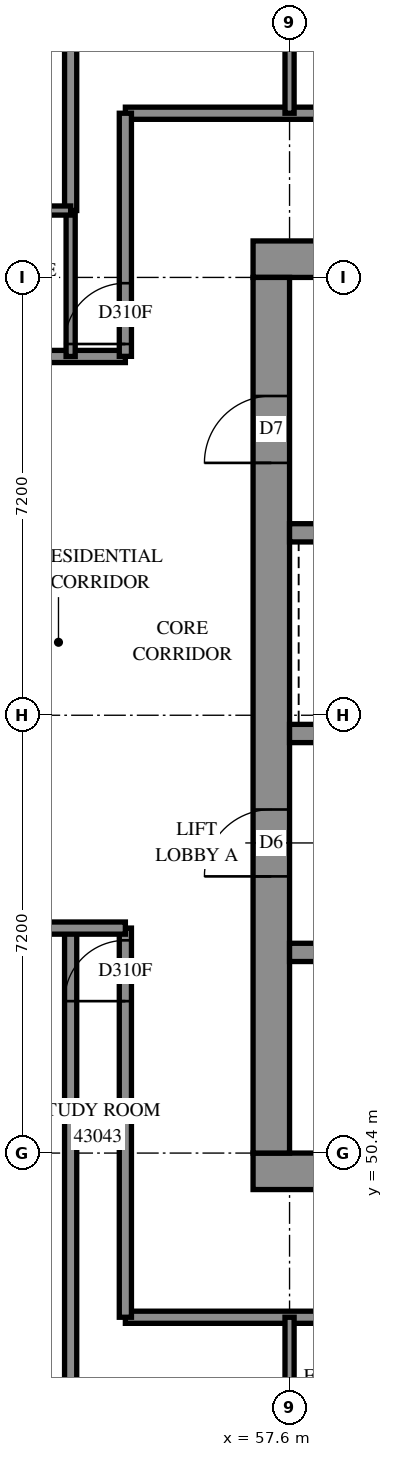
"""IFC4 building model, lengths in metres.
Left out: names, types, materials, properties, quantities, classifications, styles, units other than length and angle.
Written with IfcOpenShell. Run it as: python <this file> out.ifc"""

import sys

from ifc_helpers import new_model, si_unit, direction, frame, frame_2d, origin, place, context, subcontext, project, spatial, rectangle, extrude, element, fill, save


model = new_model("IFC4")
c1 = context("Model", 3, precision=1e-05, world=origin(), true_north=direction((0.0, 1.0)))
c2 = subcontext(c1, "Body", "Model", "MODEL_VIEW")
j1 = project(units=[si_unit("LENGTHUNIT", "METRE"), si_unit("PLANEANGLEUNIT", "RADIAN")], contexts=[c1])
p1 = place(None, origin())
s1 = spatial("IfcSite", under=j1, at=p1, CompositionType="ELEMENT")
p2 = place(p1, origin())
s2 = spatial("IfcBuilding", under=s1, at=p2, CompositionType="ELEMENT")
p3 = place(p2, frame((0.0, 0.0, 159.2)))
s3 = spatial("IfcBuildingStorey", under=s2, at=p3, CompositionType="ELEMENT", Elevation=159.2)
p4 = place(p3, frame((57.0, 50.1, -0.3), z_axis=(0.0, 0.0, 1.0), x_axis=(1.0, 0.0, 0.0)))
e1 = element("IfcWall", 1, at=p4, inside=s3, PredefinedType="SHEAR", context=c2, shape_type="SweptSolid", body=[
    extrude(rectangle(XDim=15.6, YDim=0.6, at=frame_2d((7.8, 0.0))), origin(), (0.0, 0.0, 1.0), 2.7),
])
p5 = place(p3, frame((57.0, 65.1, -0.3), z_axis=(0.0, 0.0, 1.0), x_axis=(1.0, 0.0, 0.0)))
e2 = element("IfcWall", 2, at=p5, inside=s3, PredefinedType="SHEAR", context=c2, shape_type="SweptSolid", body=[
    extrude(rectangle(XDim=15.6, YDim=0.6, at=frame_2d((7.8, 0.0))), origin(), (0.0, 0.0, 1.0), 2.7),
])
p6 = place(p5, frame((10.6, 0.0, 0.3)))
e3 = element("IfcOpeningElement", 3, at=p6, cuts=e2, PredefinedType="OPENING", context=c2, shape_type="SweptSolid", body=[
    extrude(rectangle(XDim=0.8, YDim=2.1, at=frame_2d((0.4, 1.05))), frame((0.0, 0.31, 0.0), z_axis=(0.0, -1.0, 0.0), x_axis=(1.0, 0.0, 0.0)), (0.0, 0.0, 1.0), 0.62),
])
p7 = place(p3, frame((57.3, 50.4, -0.3), z_axis=(0.0, 0.0, 1.0), x_axis=(0.0, 1.0, 0.0)))
e4 = element("IfcWall", 4, at=p7, inside=s3, PredefinedType="SHEAR", context=c2, shape_type="SweptSolid", body=[
    extrude(rectangle(XDim=14.4, YDim=0.6, at=frame_2d((7.2, 0.0))), origin(), (0.0, 0.0, 1.0), 2.7),
])
p8 = place(p7, frame((4.55, 0.0, 0.3)))
e5 = element("IfcOpeningElement", 5, at=p8, cuts=e4, PredefinedType="OPENING", context=c2, shape_type="SweptSolid", body=[
    extrude(rectangle(XDim=1.1, YDim=2.1, at=frame_2d((0.55, 1.05))), frame((0.0, 0.31, 0.0), z_axis=(0.0, -1.0, 0.0), x_axis=(1.0, 0.0, 0.0)), (0.0, 0.0, 1.0), 0.62),
])
p9 = place(p7, frame((11.35, 0.0, 0.3)))
e6 = element("IfcOpeningElement", 6, at=p9, cuts=e4, PredefinedType="OPENING", context=c2, shape_type="SweptSolid", body=[
    extrude(rectangle(XDim=1.1, YDim=2.1, at=frame_2d((0.55, 1.05))), frame((0.0, 0.31, 0.0), z_axis=(0.0, -1.0, 0.0), x_axis=(1.0, 0.0, 0.0)), (0.0, 0.0, 1.0), 0.62),
])
p10 = place(p3, frame((57.6, 53.7, 0.0), z_axis=(0.0, 0.0, 1.0), x_axis=(1.0, 0.0, 0.0)))
e7 = element("IfcWall", 7, at=p10, inside=s3, PredefinedType="SOLIDWALL", context=c2, shape_type="SweptSolid", body=[
    extrude(rectangle(XDim=14.4, YDim=0.3, at=frame_2d((7.2, 0.0))), origin(), (0.0, 0.0, 1.0), 3.1),
])
p11 = place(p10, frame((1.35, 0.0, 0.0)))
e8 = element("IfcOpeningElement", 8, at=p11, cuts=e7, PredefinedType="OPENING", context=c2, shape_type="SweptSolid", body=[
    extrude(rectangle(XDim=0.9, YDim=2.1, at=frame_2d((0.45, 1.05))), frame((0.0, 0.16, 0.0), z_axis=(0.0, -1.0, 0.0), x_axis=(1.0, 0.0, 0.0)), (0.0, 0.0, 1.0), 0.32),
])
p12 = place(p10, frame((4.95, 0.0, 0.0)))
e9 = element("IfcOpeningElement", 9, at=p12, cuts=e7, PredefinedType="OPENING", context=c2, shape_type="SweptSolid", body=[
    extrude(rectangle(XDim=0.9, YDim=2.1, at=frame_2d((0.45, 1.05))), frame((0.0, 0.16, 0.0), z_axis=(0.0, -1.0, 0.0), x_axis=(1.0, 0.0, 0.0)), (0.0, 0.0, 1.0), 0.32),
])
p13 = place(p10, frame((8.55, 0.0, 0.0)))
e10 = element("IfcOpeningElement", 10, at=p13, cuts=e7, PredefinedType="OPENING", context=c2, shape_type="SweptSolid", body=[
    extrude(rectangle(XDim=0.9, YDim=2.1, at=frame_2d((0.45, 1.05))), frame((0.0, 0.16, 0.0), z_axis=(0.0, -1.0, 0.0), x_axis=(1.0, 0.0, 0.0)), (0.0, 0.0, 1.0), 0.32),
])
p14 = place(p10, frame((12.05, 0.0, 0.0)))
e11 = element("IfcOpeningElement", 11, at=p14, cuts=e7, PredefinedType="OPENING", context=c2, shape_type="SweptSolid", body=[
    extrude(rectangle(XDim=1.1, YDim=2.1, at=frame_2d((0.55, 1.05))), frame((0.0, 0.16, 0.0), z_axis=(0.0, -1.0, 0.0), x_axis=(1.0, 0.0, 0.0)), (0.0, 0.0, 1.0), 0.32),
])
p15 = place(p3, frame((57.6, 57.3, 0.0), z_axis=(0.0, 0.0, 1.0), x_axis=(1.0, 0.0, 0.0)))
e12 = element("IfcWall", 12, at=p15, inside=s3, PredefinedType="SOLIDWALL", context=c2, shape_type="SweptSolid", body=[
    extrude(rectangle(XDim=14.4, YDim=0.3, at=frame_2d((7.2, 0.0))), origin(), (0.0, 0.0, 1.0), 3.1),
])
p16 = place(p15, frame((1.25, 0.0, 0.0)))
e13 = element("IfcOpeningElement", 13, at=p16, cuts=e12, PredefinedType="OPENING", context=c2, shape_type="SweptSolid", body=[
    extrude(rectangle(XDim=1.1, YDim=2.1, at=frame_2d((0.55, 1.05))), frame((0.0, 0.16, 0.0), z_axis=(0.0, -1.0, 0.0), x_axis=(1.0, 0.0, 0.0)), (0.0, 0.0, 1.0), 0.32),
])
p17 = place(p15, frame((4.85, 0.0, 0.0)))
e14 = element("IfcOpeningElement", 14, at=p17, cuts=e12, PredefinedType="OPENING", context=c2, shape_type="SweptSolid", body=[
    extrude(rectangle(XDim=1.1, YDim=2.1, at=frame_2d((0.55, 1.05))), frame((0.0, 0.16, 0.0), z_axis=(0.0, -1.0, 0.0), x_axis=(1.0, 0.0, 0.0)), (0.0, 0.0, 1.0), 0.32),
])
p18 = place(p15, frame((8.45, 0.0, 0.0)))
e15 = element("IfcOpeningElement", 15, at=p18, cuts=e12, PredefinedType="OPENING", context=c2, shape_type="SweptSolid", body=[
    extrude(rectangle(XDim=1.1, YDim=2.1, at=frame_2d((0.55, 1.05))), frame((0.0, 0.16, 0.0), z_axis=(0.0, -1.0, 0.0), x_axis=(1.0, 0.0, 0.0)), (0.0, 0.0, 1.0), 0.32),
])
p19 = place(p15, frame((12.05, 0.0, 0.0)))
e16 = element("IfcOpeningElement", 16, at=p19, cuts=e12, PredefinedType="OPENING", context=c2, shape_type="SweptSolid", body=[
    extrude(rectangle(XDim=1.1, YDim=2.1, at=frame_2d((0.55, 1.05))), frame((0.0, 0.16, 0.0), z_axis=(0.0, -1.0, 0.0), x_axis=(1.0, 0.0, 0.0)), (0.0, 0.0, 1.0), 0.32),
])
p20 = place(p3, frame((57.6, 60.6, 0.0), z_axis=(0.0, 0.0, 1.0), x_axis=(1.0, 0.0, 0.0)))
e17 = element("IfcWall", 17, at=p20, inside=s3, PredefinedType="SOLIDWALL", context=c2, shape_type="SweptSolid", body=[
    extrude(rectangle(XDim=7.2, YDim=0.3, at=frame_2d((3.6, 0.0))), origin(), (0.0, 0.0, 1.0), 3.1),
])
p21 = place(p3, frame((54.9, 67.5, 0.0), z_axis=(0.0, 0.0, 1.0), x_axis=(1.0, 0.0, 0.0)))
e18 = element("IfcWall", 18, at=p21, inside=s3, PredefinedType="PARTITIONING", context=c2, shape_type="SweptSolid", body=[
    extrude(rectangle(XDim=19.8, YDim=0.2, at=frame_2d((9.9, 0.0))), origin(), (0.0, 0.0, 1.0), 3.1),
])
p22 = place(p21, frame((6.599, 0.0, 0.0)))
e19 = element("IfcOpeningElement", 19, at=p22, cuts=e18, PredefinedType="OPENING", context=c2, shape_type="SweptSolid", body=[
    extrude(rectangle(XDim=0.9, YDim=2.1, at=frame_2d((0.45, 1.05))), frame((0.0, 0.11, 0.0), z_axis=(0.0, -1.0, 0.0), x_axis=(1.0, 0.0, 0.0)), (0.0, 0.0, 1.0), 0.22),
])
p23 = place(p21, frame((13.799, 0.0, 0.0)))
e20 = element("IfcOpeningElement", 20, at=p23, cuts=e18, PredefinedType="OPENING", context=c2, shape_type="SweptSolid", body=[
    extrude(rectangle(XDim=0.9, YDim=2.1, at=frame_2d((0.45, 1.05))), frame((0.0, 0.11, 0.0), z_axis=(0.0, -1.0, 0.0), x_axis=(1.0, 0.0, 0.0)), (0.0, 0.0, 1.0), 0.22),
])
p24 = place(p3, frame((54.9, 47.7, 0.0), z_axis=(0.0, 0.0, 1.0), x_axis=(1.0, 0.0, 0.0)))
e21 = element("IfcWall", 21, at=p24, inside=s3, PredefinedType="PARTITIONING", context=c2, shape_type="SweptSolid", body=[
    extrude(rectangle(XDim=19.326, YDim=0.2, at=frame_2d((9.663, 0.0))), origin(), (0.0, 0.0, 1.0), 3.1),
])
p25 = place(p24, frame((6.599, 0.0, 0.0)))
e22 = element("IfcOpeningElement", 22, at=p25, cuts=e21, PredefinedType="OPENING", context=c2, shape_type="SweptSolid", body=[
    extrude(rectangle(XDim=0.9, YDim=2.1, at=frame_2d((0.45, 1.05))), frame((0.0, 0.11, 0.0), z_axis=(0.0, -1.0, 0.0), x_axis=(1.0, 0.0, 0.0)), (0.0, 0.0, 1.0), 0.22),
])
p26 = place(p24, frame((14.101, 0.0, 0.0)))
e23 = element("IfcOpeningElement", 23, at=p26, cuts=e21, PredefinedType="OPENING", context=c2, shape_type="SweptSolid", body=[
    extrude(rectangle(XDim=0.9, YDim=2.1, at=frame_2d((0.45, 1.05))), frame((0.0, 0.11, 0.0), z_axis=(0.0, -1.0, 0.0), x_axis=(1.0, 0.0, 0.0)), (0.0, 0.0, 1.0), 0.22),
])
p27 = place(p3, frame((40.702, 63.5, 0.0), z_axis=(0.0, 0.0, 1.0), x_axis=(1.0, 0.0, 0.0)))
e24 = element("IfcWall", 24, at=p27, inside=s3, PredefinedType="PARTITIONING", context=c2, shape_type="SweptSolid", body=[
    extrude(rectangle(XDim=14.198, YDim=0.2, at=frame_2d((7.099, 0.0))), origin(), (0.0, 0.0, 1.0), 3.1),
])
p28 = place(p27, frame((6.692, 0.0, 0.0)))
e25 = element("IfcOpeningElement", 25, at=p28, cuts=e24, PredefinedType="OPENING", context=c2, shape_type="SweptSolid", body=[
    extrude(rectangle(XDim=0.9, YDim=2.1, at=frame_2d((0.45, 1.05))), frame((0.0, 0.11, 0.0), z_axis=(0.0, -1.0, 0.0), x_axis=(1.0, 0.0, 0.0)), (0.0, 0.0, 1.0), 0.22),
])
p29 = place(p27, frame((10.25, 0.0, 0.0)))
e26 = element("IfcOpeningElement", 26, at=p29, cuts=e24, PredefinedType="OPENING", context=c2, shape_type="SweptSolid", body=[
    extrude(rectangle(XDim=0.9, YDim=2.1, at=frame_2d((0.45, 1.05))), frame((0.0, 0.11, 0.0), z_axis=(0.0, -1.0, 0.0), x_axis=(1.0, 0.0, 0.0)), (0.0, 0.0, 1.0), 0.22),
])
p30 = place(p3, frame((54.0, 42.297, 0.0), z_axis=(0.0, 0.0, 1.0), x_axis=(0.0, 1.0, 0.0)))
e27 = element("IfcWall", 27, at=p30, inside=s3, PredefinedType="PARTITIONING", context=c2, shape_type="SweptSolid", body=[
    extrude(rectangle(XDim=11.803, YDim=0.2, at=frame_2d((5.901, 0.0))), origin(), (0.0, 0.0, 1.0), 3.1),
])
p31 = place(p3, frame((54.0, 65.9, 0.0), z_axis=(0.0, 0.0, 1.0), x_axis=(0.0, 1.0, 0.0)))
e28 = element("IfcWall", 28, at=p31, inside=s3, PredefinedType="PARTITIONING", context=c2, shape_type="SweptSolid", body=[
    extrude(rectangle(XDim=6.859, YDim=0.2, at=frame_2d((3.429, 0.0))), origin(), (0.0, 0.0, 1.0), 3.1),
])
p32 = place(p3, frame((54.9, 47.7, 0.0), z_axis=(0.0, 0.0, 1.0), x_axis=(0.0, 1.0, 0.0)))
e29 = element("IfcWall", 29, at=p32, inside=s3, PredefinedType="PARTITIONING", context=c2, shape_type="SweptSolid", body=[
    extrude(rectangle(XDim=6.4, YDim=0.2, at=frame_2d((3.2, 0.0))), origin(), (0.0, 0.0, 1.0), 3.1),
])
p33 = place(p32, frame((5.199, 0.0, 0.0)))
e30 = element("IfcOpeningElement", 30, at=p33, cuts=e29, PredefinedType="OPENING", context=c2, shape_type="SweptSolid", body=[
    extrude(rectangle(XDim=1.0, YDim=2.1, at=frame_2d((0.5, 1.05))), frame((0.0, 0.11, 0.0), z_axis=(0.0, -1.0, 0.0), x_axis=(1.0, 0.0, 0.0)), (0.0, 0.0, 1.0), 0.22),
])
p34 = place(p3, frame((50.4, 54.1, 0.0), z_axis=(0.0, 0.0, 1.0), x_axis=(1.0, 0.0, 0.0)))
e31 = element("IfcWall", 31, at=p34, inside=s3, PredefinedType="PARTITIONING", context=c2, shape_type="SweptSolid", body=[
    extrude(rectangle(XDim=4.5, YDim=0.2, at=frame_2d((2.25, 0.0))), origin(), (0.0, 0.0, 1.0), 3.1),
])
p35 = place(p34, frame((2.3, 0.0, 0.0)))
e32 = element("IfcOpeningElement", 32, at=p35, cuts=e31, PredefinedType="OPENING", context=c2, shape_type="SweptSolid", body=[
    extrude(rectangle(XDim=0.9, YDim=2.1, at=frame_2d((0.45, 1.05))), frame((0.0, 0.11, 0.0), z_axis=(0.0, -1.0, 0.0), x_axis=(1.0, 0.0, 0.0)), (0.0, 0.0, 1.0), 0.22),
])
p36 = place(p3, frame((54.9, 63.502, 0.0), z_axis=(0.0, 0.0, 1.0), x_axis=(0.0, 1.0, 0.0)))
e33 = element("IfcWall", 33, at=p36, inside=s3, PredefinedType="PARTITIONING", context=c2, shape_type="SweptSolid", body=[
    extrude(rectangle(XDim=3.998, YDim=0.2, at=frame_2d((1.999, 0.0))), origin(), (0.0, 0.0, 1.0), 3.1),
])
p37 = place(p36, frame((0.203, 0.0, 0.0)))
e34 = element("IfcOpeningElement", 34, at=p37, cuts=e33, PredefinedType="OPENING", context=c2, shape_type="SweptSolid", body=[
    extrude(rectangle(XDim=1.0, YDim=2.1, at=frame_2d((0.5, 1.05))), frame((0.0, 0.11, 0.0), z_axis=(0.0, -1.0, 0.0), x_axis=(1.0, 0.0, 0.0)), (0.0, 0.0, 1.0), 0.22),
])
for number, where, z_axis, x_axis in (
    (35, (54.0, 63.5, 0.0), (0.0, 0.0, 1.0), (0.0, 1.0, 0.0)),
    (36, (57.6, 45.3, 0.0), (0.0, 0.0, 1.0), (0.0, 1.0, 0.0)),
    (37, (57.6, 67.5, 0.0), (0.0, 0.0, 1.0), (0.0, 1.0, 0.0)),
):
    element("IfcWall", number, at=place(p3, frame(where, z_axis=z_axis, x_axis=x_axis)), inside=s3, PredefinedType="PARTITIONING", context=c2, shape_type="SweptSolid", body=[
        extrude(rectangle(XDim=2.4, YDim=0.15, at=frame_2d((1.2, 0.0))), origin(), (0.0, 0.0, 1.0), 3.1),
    ])
p38 = place(p3, frame((52.1, 65.9, 0.0), z_axis=(0.0, 0.0, 1.0), x_axis=(1.0, 0.0, 0.0)))
e38 = element("IfcWall", 38, at=p38, inside=s3, PredefinedType="PARTITIONING", context=c2, shape_type="SweptSolid", body=[
    extrude(rectangle(XDim=1.9, YDim=0.15, at=frame_2d((0.95, 0.0))), origin(), (0.0, 0.0, 1.0), 3.1),
])
p39 = place(p38, frame((0.493, 0.0, 0.0)))
e39 = element("IfcOpeningElement", 39, at=p39, cuts=e38, PredefinedType="OPENING", context=c2, shape_type="SweptSolid", body=[
    extrude(rectangle(XDim=0.8, YDim=2.1, at=frame_2d((0.4, 1.05))), frame((0.0, 0.085, 0.0), z_axis=(0.0, -1.0, 0.0), x_axis=(1.0, 0.0, 0.0)), (0.0, 0.0, 1.0), 0.17),
])
p40 = place(p8, origin())
e40 = element("IfcDoor", 40, at=p40, inside=s3, OperationType="DOUBLE_DOOR_SINGLE_SWING", PredefinedType="DOOR", context=c2, shape_type="SweptSolid", body=[
    extrude(rectangle(XDim=1.1, YDim=2.1, at=frame_2d((0.55, 1.05))), frame((0.0, 0.025, 0.0), z_axis=(0.0, -1.0, 0.0), x_axis=(1.0, 0.0, 0.0)), (0.0, 0.0, 1.0), 0.05),
])
fill(e5, e40)
p41 = place(p9, origin())
e41 = element("IfcDoor", 41, at=p41, inside=s3, OperationType="SINGLE_SWING_LEFT", PredefinedType="DOOR", context=c2, shape_type="SweptSolid", body=[
    extrude(rectangle(XDim=1.1, YDim=2.1, at=frame_2d((0.55, 1.05))), frame((0.0, 0.025, 0.0), z_axis=(0.0, -1.0, 0.0), x_axis=(1.0, 0.0, 0.0)), (0.0, 0.0, 1.0), 0.05),
])
fill(e6, e41)
p42 = place(p37, origin())
e42 = element("IfcDoor", 42, at=p42, inside=s3, OperationType="SINGLE_SWING_LEFT", PredefinedType="DOOR", context=c2, shape_type="SweptSolid", body=[
    extrude(rectangle(XDim=1.0, YDim=2.1, at=frame_2d((0.5, 1.05))), frame((0.0, 0.025, 0.0), z_axis=(0.0, -1.0, 0.0), x_axis=(1.0, 0.0, 0.0)), (0.0, 0.0, 1.0), 0.05),
])
fill(e34, e42)
p43 = place(p33, origin())
e43 = element("IfcDoor", 43, at=p43, inside=s3, OperationType="SINGLE_SWING_RIGHT", PredefinedType="DOOR", context=c2, shape_type="SweptSolid", body=[
    extrude(rectangle(XDim=1.0, YDim=2.1, at=frame_2d((0.5, 1.05))), frame((0.0, 0.025, 0.0), z_axis=(0.0, -1.0, 0.0), x_axis=(1.0, 0.0, 0.0)), (0.0, 0.0, 1.0), 0.05),
])
fill(e30, e43)
save(model, sys.argv[1])
